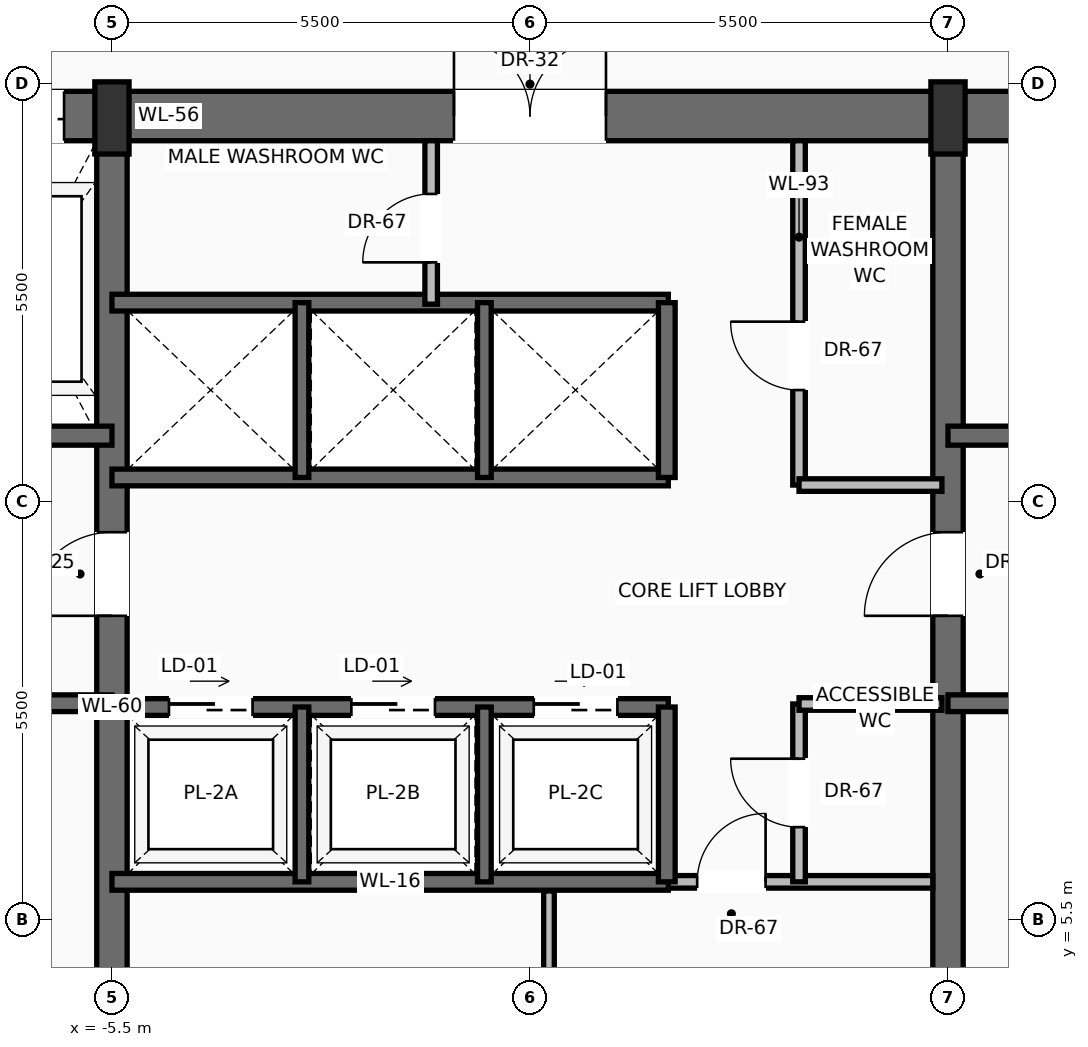
"""IFC4 building model, lengths in metres.
Left out: names, types, materials, properties, quantities, classifications, styles, units other than length and angle.
Written with IfcOpenShell. Run it as: python <this file> out.ifc"""

import sys

from ifc_helpers import new_model, si_unit, direction, frame, frame_2d, origin, origin_2d, place, context, subcontext, project, spatial, rectangle, extrude, source, transform, mapped, element, fill, save


model = new_model("IFC4")
c1 = context("Model", 3, precision=1e-05, world=origin(), true_north=direction((0.0, 1.0)))
c2 = subcontext(c1, "Body", "Model", "MODEL_VIEW")
j1 = project(units=[si_unit("LENGTHUNIT", "METRE"), si_unit("PLANEANGLEUNIT", "RADIAN")], contexts=[c1])
p1 = place(None, origin())
s1 = spatial("IfcSite", under=j1, at=p1, CompositionType="ELEMENT")
p2 = place(p1, origin())
s2 = spatial("IfcBuilding", under=s1, at=p2, CompositionType="ELEMENT")
p3 = place(p2, frame((0.0, 0.0, 171.0)))
s3 = spatial("IfcBuildingStorey", under=s2, at=p3, CompositionType="ELEMENT", Elevation=171.0)
p4 = place(p3, frame((-10.8, 16.075, 0.0), z_axis=(0.0, 0.0, 1.0), x_axis=(1.0, 0.0, 0.0)))
e1 = element("IfcWall", 1, at=p4, inside=s3, PredefinedType="SHEAR", context=c2, shape_type="SweptSolid", body=[
    extrude(rectangle(XDim=21.6, YDim=0.65, at=frame_2d((10.8, 0.0))), origin(), (0.0, 0.0, 1.0), 3.47),
])
p5 = place(p4, frame((3.37, 0.0, 0.0)))
e2 = element("IfcOpeningElement", 2, at=p5, cuts=e1, PredefinedType="OPENING", context=c2, shape_type="SweptSolid", body=[
    extrude(rectangle(XDim=1.3, YDim=2.3, at=frame_2d((0.65, 1.15))), frame((0.0, 0.335, 0.0), z_axis=(0.0, -1.0, 0.0), x_axis=(1.0, 0.0, 0.0)), (0.0, 0.0, 1.0), 0.67),
])
p6 = place(p4, frame((9.8, 0.0, 0.0)))
e3 = element("IfcOpeningElement", 3, at=p6, cuts=e1, PredefinedType="OPENING", context=c2, shape_type="SweptSolid", body=[
    extrude(rectangle(XDim=2.0, YDim=2.4, at=frame_2d((1.0, 1.2))), frame((0.0, 0.335, 0.0), z_axis=(0.0, -1.0, 0.0), x_axis=(1.0, 0.0, 0.0)), (0.0, 0.0, 1.0), 0.67),
])
p7 = place(p3, frame((-5.5, 0.525, 0.0), z_axis=(0.0, 0.0, 1.0), x_axis=(0.0, 1.0, 0.0)))
e4 = element("IfcWall", 4, at=p7, inside=s3, PredefinedType="SHEAR", context=c2, shape_type="SweptSolid", body=[
    extrude(rectangle(XDim=15.55, YDim=0.4, at=frame_2d((7.775, 0.0))), origin(), (0.0, 0.0, 1.0), 3.47),
])
p8 = place(p7, frame((8.975, 0.0, 0.0)))
e5 = element("IfcOpeningElement", 5, at=p8, cuts=e4, PredefinedType="OPENING", context=c2, shape_type="SweptSolid", body=[
    extrude(rectangle(XDim=1.1, YDim=2.2, at=frame_2d((0.55, 1.1))), frame((0.0, 0.21, 0.0), z_axis=(0.0, -1.0, 0.0), x_axis=(1.0, 0.0, 0.0)), (0.0, 0.0, 1.0), 0.42),
])
p9 = place(p3, frame((5.5, 0.525, 0.0), z_axis=(0.0, 0.0, 1.0), x_axis=(0.0, 1.0, 0.0)))
e6 = element("IfcWall", 6, at=p9, inside=s3, PredefinedType="SHEAR", context=c2, shape_type="SweptSolid", body=[
    extrude(rectangle(XDim=15.55, YDim=0.4, at=frame_2d((7.775, 0.0))), origin(), (0.0, 0.0, 1.0), 3.47),
])
p10 = place(p9, frame((8.975, 0.0, 0.0)))
e7 = element("IfcOpeningElement", 7, at=p10, cuts=e6, PredefinedType="OPENING", context=c2, shape_type="SweptSolid", body=[
    extrude(rectangle(XDim=1.1, YDim=2.2, at=frame_2d((0.55, 1.1))), frame((0.0, 0.21, 0.0), z_axis=(0.0, -1.0, 0.0), x_axis=(1.0, 0.0, 0.0)), (0.0, 0.0, 1.0), 0.42),
])
m1 = source(origin(), c2, "Body", "SweptSolid", [
    extrude(rectangle(XDim=0.45, YDim=0.95, at=origin_2d()), origin(), (0.0, 0.0, 1.0), 3.7),
])
for number, where, z_axis, x_axis in (
    (8, (-5.5, 16.05, 0.0), (0.0, 0.0, 1.0), (1.0, 0.0, 0.0)),
    (9, (5.5, 16.05, 0.0), (0.0, 0.0, 1.0), (1.0, 0.0, 0.0)),
):
    element("IfcColumn", number, at=place(p3, frame(where, z_axis=z_axis, x_axis=x_axis)), inside=s3, PredefinedType="PILASTER", context=c2, shape_type="MappedRepresentation", body=[
        mapped(m1, transform((0.0, 0.0, 0.0), scale=1.0)),
    ])
p11 = place(p3, frame((-5.5, 8.35, 0.0), z_axis=(0.0, 0.0, 1.0), x_axis=(-1.0, 0.0, 0.0)))
e10 = element("IfcWall", 10, at=p11, inside=s3, PredefinedType="SOLIDWALL", context=c2, shape_type="SweptSolid", body=[
    extrude(rectangle(XDim=4.65, YDim=0.22, at=frame_2d((2.325, 0.0))), origin(), (0.0, 0.0, 1.0), 3.47),
])
p12 = place(p11, frame((2.5, 0.0, 0.0)))
e11 = element("IfcOpeningElement", 11, at=p12, cuts=e10, PredefinedType="OPENING", context=c2, shape_type="SweptSolid", body=[
    extrude(rectangle(XDim=1.15, YDim=2.2, at=frame_2d((0.575, 1.1))), frame((0.0, 0.12, 0.0), z_axis=(0.0, -1.0, 0.0), x_axis=(1.0, 0.0, 0.0)), (0.0, 0.0, 1.0), 0.24),
])
p13 = place(p3, frame((-5.5, 11.87, 0.0), z_axis=(0.0, 0.0, 1.0), x_axis=(-1.0, 0.0, 0.0)))
e12 = element("IfcWall", 12, at=p13, inside=s3, PredefinedType="SOLIDWALL", context=c2, shape_type="SweptSolid", body=[
    extrude(rectangle(XDim=4.65, YDim=0.25, at=frame_2d((2.325, 0.0))), origin(), (0.0, 0.0, 1.0), 3.47),
])
p14 = place(p13, frame((2.95, 0.0, 0.0)))
e13 = element("IfcOpeningElement", 13, at=p14, cuts=e12, PredefinedType="OPENING", context=c2, shape_type="SweptSolid", body=[
    extrude(rectangle(XDim=1.2, YDim=2.25, at=frame_2d((0.6, 1.125))), frame((0.0, 0.135, 0.0), z_axis=(0.0, -1.0, 0.0), x_axis=(1.0, 0.0, 0.0)), (0.0, 0.0, 1.0), 0.27),
])
p15 = place(p3, frame((10.15, 8.35, 0.0), z_axis=(0.0, 0.0, 1.0), x_axis=(-1.0, 0.0, 0.0)))
e14 = element("IfcWall", 14, at=p15, inside=s3, PredefinedType="SOLIDWALL", context=c2, shape_type="SweptSolid", body=[
    extrude(rectangle(XDim=4.65, YDim=0.22, at=frame_2d((2.325, 0.0))), origin(), (0.0, 0.0, 1.0), 3.47),
])
p16 = place(p15, frame((1.0, 0.0, 0.0)))
e15 = element("IfcOpeningElement", 15, at=p16, cuts=e14, PredefinedType="OPENING", context=c2, shape_type="SweptSolid", body=[
    extrude(rectangle(XDim=1.15, YDim=2.2, at=frame_2d((0.575, 1.1))), frame((0.0, 0.12, 0.0), z_axis=(0.0, -1.0, 0.0), x_axis=(1.0, 0.0, 0.0)), (0.0, 0.0, 1.0), 0.24),
])
p17 = place(p3, frame((10.15, 11.87, 0.0), z_axis=(0.0, 0.0, 1.0), x_axis=(-1.0, 0.0, 0.0)))
e16 = element("IfcWall", 16, at=p17, inside=s3, PredefinedType="SOLIDWALL", context=c2, shape_type="SweptSolid", body=[
    extrude(rectangle(XDim=4.65, YDim=0.25, at=frame_2d((2.325, 0.0))), origin(), (0.0, 0.0, 1.0), 3.47),
])
p18 = place(p17, frame((0.5, 0.0, 0.0)))
e17 = element("IfcOpeningElement", 17, at=p18, cuts=e16, PredefinedType="OPENING", context=c2, shape_type="SweptSolid", body=[
    extrude(rectangle(XDim=1.2, YDim=2.25, at=frame_2d((0.6, 1.125))), frame((0.0, 0.135, 0.0), z_axis=(0.0, -1.0, 0.0), x_axis=(1.0, 0.0, 0.0)), (0.0, 0.0, 1.0), 0.27),
])
p19 = place(p3, frame((1.82, 6.0, 0.0), z_axis=(0.0, 0.0, 1.0), x_axis=(1.0, 0.0, 0.0)))
e18 = element("IfcWall", 18, at=p19, inside=s3, PredefinedType="PARTITIONING", context=c2, shape_type="SweptSolid", body=[
    extrude(rectangle(XDim=3.48, YDim=0.165, at=frame_2d((1.74, 0.0))), origin(), (0.0, 0.0, 1.0), 3.462),
])
p20 = place(p19, frame((0.38, 0.0, 0.0)))
e19 = element("IfcOpeningElement", 19, at=p20, cuts=e18, PredefinedType="OPENING", context=c2, shape_type="SweptSolid", body=[
    extrude(rectangle(XDim=0.9, YDim=2.1, at=frame_2d((0.45, 1.05))), frame((0.0, 0.093, 0.0), z_axis=(0.0, -1.0, 0.0), x_axis=(1.0, 0.0, 0.0)), (0.0, 0.0, 1.0), 0.185),
])
p21 = place(p3, frame((0.25, 0.85, 0.0), z_axis=(0.0, 0.0, 1.0), x_axis=(0.0, 1.0, 0.0)))
e20 = element("IfcWall", 20, at=p21, inside=s3, PredefinedType="PARTITIONING", context=c2, shape_type="SweptSolid", body=[
    extrude(rectangle(XDim=5.03, YDim=0.14, at=frame_2d((2.515, 0.0))), origin(), (0.0, 0.0, 1.0), 3.462),
])
p22 = place(p21, frame((2.1, 0.0, 0.0)))
e21 = element("IfcOpeningElement", 21, at=p22, cuts=e20, PredefinedType="OPENING", context=c2, shape_type="SweptSolid", body=[
    extrude(rectangle(XDim=0.9, YDim=2.1, at=frame_2d((0.45, 1.05))), frame((0.0, 0.08, 0.0), z_axis=(0.0, -1.0, 0.0), x_axis=(1.0, 0.0, 0.0)), (0.0, 0.0, 1.0), 0.16),
])
p23 = place(p3, frame((3.54, 6.0, 0.0), z_axis=(0.0, 0.0, 1.0), x_axis=(0.0, 1.0, 0.0)))
e22 = element("IfcWall", 22, at=p23, inside=s3, PredefinedType="PARTITIONING", context=c2, shape_type="SweptSolid", body=[
    extrude(rectangle(XDim=2.34, YDim=0.165, at=frame_2d((1.17, 0.0))), origin(), (0.0, 0.0, 1.0), 3.462),
])
p24 = place(p23, frame((0.72, 0.0, 0.0)))
e23 = element("IfcOpeningElement", 23, at=p24, cuts=e22, PredefinedType="OPENING", context=c2, shape_type="SweptSolid", body=[
    extrude(rectangle(XDim=0.9, YDim=2.1, at=frame_2d((0.45, 1.05))), frame((0.0, 0.093, 0.0), z_axis=(0.0, -1.0, 0.0), x_axis=(1.0, 0.0, 0.0)), (0.0, 0.0, 1.0), 0.185),
])
p25 = place(p3, frame((3.54, 8.34, 0.0), z_axis=(0.0, 0.0, 1.0), x_axis=(1.0, 0.0, 0.0)))
e24 = element("IfcWall", 24, at=p25, inside=s3, PredefinedType="PARTITIONING", context=c2, shape_type="SweptSolid", body=[
    extrude(rectangle(XDim=1.88, YDim=0.165, at=frame_2d((0.94, 0.0))), origin(), (0.0, 0.0, 1.0), 3.462),
])
p26 = place(p3, frame((-5.5, 6.0, 0.0), z_axis=(0.0, 0.0, 1.0), x_axis=(1.0, 0.0, 0.0)))
e25 = element("IfcWall", 25, at=p26, inside=s3, PredefinedType="SOLIDWALL", context=c2, shape_type="SweptSolid", body=[
    extrude(rectangle(XDim=7.32, YDim=0.22, at=frame_2d((3.66, 0.0))), origin(), (0.0, 0.0, 1.0), 3.47),
])
p27 = place(p3, frame((-5.5, 8.3, 0.0), z_axis=(0.0, 0.0, 1.0), x_axis=(1.0, 0.0, 0.0)))
e26 = element("IfcWall", 26, at=p27, inside=s3, PredefinedType="SOLIDWALL", context=c2, shape_type="SweptSolid", body=[
    extrude(rectangle(XDim=7.32, YDim=0.22, at=frame_2d((3.66, 0.0))), origin(), (0.0, 0.0, 1.0), 3.47),
])
p28 = place(p27, frame((0.75, 0.0, 0.0)))
e27 = element("IfcOpeningElement", 27, at=p28, cuts=e26, PredefinedType="OPENING", context=c2, shape_type="SweptSolid", body=[
    extrude(rectangle(XDim=1.1, YDim=2.2, at=frame_2d((0.55, 1.1))), frame((0.0, 0.12, 0.0), z_axis=(0.0, -1.0, 0.0), x_axis=(1.0, 0.0, 0.0)), (0.0, 0.0, 1.0), 0.24),
])
p29 = place(p27, frame((3.15, 0.0, 0.0)))
e28 = element("IfcOpeningElement", 28, at=p29, cuts=e26, PredefinedType="OPENING", context=c2, shape_type="SweptSolid", body=[
    extrude(rectangle(XDim=1.1, YDim=2.2, at=frame_2d((0.55, 1.1))), frame((0.0, 0.12, 0.0), z_axis=(0.0, -1.0, 0.0), x_axis=(1.0, 0.0, 0.0)), (0.0, 0.0, 1.0), 0.24),
])
p30 = place(p27, frame((5.55, 0.0, 0.0)))
e29 = element("IfcOpeningElement", 29, at=p30, cuts=e26, PredefinedType="OPENING", context=c2, shape_type="SweptSolid", body=[
    extrude(rectangle(XDim=1.1, YDim=2.2, at=frame_2d((0.55, 1.1))), frame((0.0, 0.12, 0.0), z_axis=(0.0, -1.0, 0.0), x_axis=(1.0, 0.0, 0.0)), (0.0, 0.0, 1.0), 0.24),
])
p31 = place(p3, frame((1.8, 6.0, 0.0), z_axis=(0.0, 0.0, 1.0), x_axis=(0.0, 1.0, 0.0)))
e30 = element("IfcWall", 30, at=p31, inside=s3, PredefinedType="SOLIDWALL", context=c2, shape_type="SweptSolid", body=[
    extrude(rectangle(XDim=2.3, YDim=0.22, at=frame_2d((1.15, 0.0))), origin(), (0.0, 0.0, 1.0), 3.47),
])
for number, where, z_axis, x_axis in (
    (31, (-3.0, 6.0, 0.0), (0.0, 0.0, 1.0), (0.0, 1.0, 0.0)),
    (32, (-0.6, 6.0, 0.0), (0.0, 0.0, 1.0), (0.0, 1.0, 0.0)),
):
    element("IfcWall", number, at=place(p3, frame(where, z_axis=z_axis, x_axis=x_axis)), inside=s3, PredefinedType="SOLIDWALL", context=c2, shape_type="SweptSolid", body=[
        extrude(rectangle(XDim=2.3, YDim=0.18, at=frame_2d((1.15, 0.0))), origin(), (0.0, 0.0, 1.0), 3.47),
    ])
for number, where, z_axis, x_axis in (
    (33, (-5.5, 11.32, 0.0), (0.0, 0.0, 1.0), (1.0, 0.0, 0.0)),
    (34, (-5.5, 13.62, 0.0), (0.0, 0.0, 1.0), (1.0, 0.0, 0.0)),
):
    element("IfcWall", number, at=place(p3, frame(where, z_axis=z_axis, x_axis=x_axis)), inside=s3, PredefinedType="SOLIDWALL", context=c2, shape_type="SweptSolid", body=[
        extrude(rectangle(XDim=7.32, YDim=0.22, at=frame_2d((3.66, 0.0))), origin(), (0.0, 0.0, 1.0), 3.47),
    ])
p32 = place(p3, frame((1.8, 11.32, 0.0), z_axis=(0.0, 0.0, 1.0), x_axis=(0.0, 1.0, 0.0)))
e35 = element("IfcWall", 35, at=p32, inside=s3, PredefinedType="SOLIDWALL", context=c2, shape_type="SweptSolid", body=[
    extrude(rectangle(XDim=2.3, YDim=0.22, at=frame_2d((1.15, 0.0))), origin(), (0.0, 0.0, 1.0), 3.47),
])
for number, where, z_axis, x_axis in (
    (36, (-3.0, 11.32, 0.0), (0.0, 0.0, 1.0), (0.0, 1.0, 0.0)),
    (37, (-0.6, 11.32, 0.0), (0.0, 0.0, 1.0), (0.0, 1.0, 0.0)),
):
    element("IfcWall", number, at=place(p3, frame(where, z_axis=z_axis, x_axis=x_axis)), inside=s3, PredefinedType="SOLIDWALL", context=c2, shape_type="SweptSolid", body=[
        extrude(rectangle(XDim=2.3, YDim=0.18, at=frame_2d((1.15, 0.0))), origin(), (0.0, 0.0, 1.0), 3.47),
    ])
p33 = place(p3, frame((-1.3, 13.6, 0.0), z_axis=(0.0, 0.0, 1.0), x_axis=(0.0, 1.0, 0.0)))
e38 = element("IfcWall", 38, at=p33, inside=s3, PredefinedType="PARTITIONING", context=c2, shape_type="SweptSolid", body=[
    extrude(rectangle(XDim=2.15, YDim=0.165, at=frame_2d((1.075, 0.0))), origin(), (0.0, 0.0, 1.0), 3.462),
])
p34 = place(p33, frame((0.55, 0.0, 0.0)))
e39 = element("IfcOpeningElement", 39, at=p34, cuts=e38, PredefinedType="OPENING", context=c2, shape_type="SweptSolid", body=[
    extrude(rectangle(XDim=0.9, YDim=2.1, at=frame_2d((0.45, 1.05))), frame((0.0, 0.093, 0.0), z_axis=(0.0, -1.0, 0.0), x_axis=(1.0, 0.0, 0.0)), (0.0, 0.0, 1.0), 0.185),
])
p35 = place(p3, frame((3.54, 11.22, 0.0), z_axis=(0.0, 0.0, 1.0), x_axis=(0.0, 1.0, 0.0)))
e40 = element("IfcWall", 40, at=p35, inside=s3, PredefinedType="PARTITIONING", context=c2, shape_type="SweptSolid", body=[
    extrude(rectangle(XDim=4.53, YDim=0.165, at=frame_2d((2.265, 0.0))), origin(), (0.0, 0.0, 1.0), 3.462),
])
p36 = place(p35, frame((1.25, 0.0, 0.0)))
e41 = element("IfcOpeningElement", 41, at=p36, cuts=e40, PredefinedType="OPENING", context=c2, shape_type="SweptSolid", body=[
    extrude(rectangle(XDim=0.9, YDim=2.1, at=frame_2d((0.45, 1.05))), frame((0.0, 0.093, 0.0), z_axis=(0.0, -1.0, 0.0), x_axis=(1.0, 0.0, 0.0)), (0.0, 0.0, 1.0), 0.185),
])
p37 = place(p3, frame((3.54, 11.22, 0.0), z_axis=(0.0, 0.0, 1.0), x_axis=(1.0, 0.0, 0.0)))
e42 = element("IfcWall", 42, at=p37, inside=s3, PredefinedType="PARTITIONING", context=c2, shape_type="SweptSolid", body=[
    extrude(rectangle(XDim=1.88, YDim=0.165, at=frame_2d((0.94, 0.0))), origin(), (0.0, 0.0, 1.0), 3.462),
])
m2 = source(origin(), c2, "Body", "SweptSolid", [
    extrude(rectangle(XDim=1.1, YDim=2.2, at=frame_2d((0.55, 1.1))), frame((0.0, 0.025, 0.0), z_axis=(0.0, -1.0, 0.0), x_axis=(1.0, 0.0, 0.0)), (0.0, 0.0, 1.0), 0.05),
])
p38 = place(p8, origin())
e43 = element("IfcDoor", 43, at=p38, inside=s3, OperationType="SINGLE_SWING_LEFT", PredefinedType="DOOR", context=c2, shape_type="MappedRepresentation", body=[
    mapped(m2, transform((0.0, 0.0, 0.0), scale=1.0)),
])
fill(e5, e43)
m3 = source(origin(), c2, "Body", "SweptSolid", [
    extrude(rectangle(XDim=1.3, YDim=2.3, at=frame_2d((0.65, 1.15))), frame((0.0, 0.025, 0.0), z_axis=(0.0, -1.0, 0.0), x_axis=(1.0, 0.0, 0.0)), (0.0, 0.0, 1.0), 0.05),
])
p39 = place(p5, origin())
e44 = element("IfcDoor", 44, at=p39, inside=s3, OperationType="SLIDING_TO_RIGHT", PredefinedType="DOOR", context=c2, shape_type="MappedRepresentation", body=[
    mapped(m3, transform((0.0, 0.0, 0.0), scale=1.0)),
])
fill(e2, e44)
p40 = place(p10, origin())
e45 = element("IfcDoor", 45, at=p40, inside=s3, OperationType="SINGLE_SWING_LEFT", PredefinedType="DOOR", context=c2, shape_type="MappedRepresentation", body=[
    mapped(m2, transform((0.0, 0.0, 0.0), scale=1.0)),
])
fill(e7, e45)
m4 = source(origin(), c2, "Body", "SweptSolid", [
    extrude(rectangle(XDim=2.0, YDim=2.4, at=frame_2d((1.0, 1.2))), frame((0.0, 0.025, 0.0), z_axis=(0.0, -1.0, 0.0), x_axis=(1.0, 0.0, 0.0)), (0.0, 0.0, 1.0), 0.05),
])
p41 = place(p6, origin())
e46 = element("IfcDoor", 46, at=p41, inside=s3, OperationType="DOUBLE_DOOR_SINGLE_SWING", PredefinedType="DOOR", context=c2, shape_type="MappedRepresentation", body=[
    mapped(m4, transform((0.0, 0.0, 0.0), scale=1.0)),
])
fill(e3, e46)
m5 = source(origin(), c2, "Body", "SweptSolid", [
    extrude(rectangle(XDim=0.9, YDim=2.1, at=frame_2d((0.45, 1.05))), frame((0.0, 0.025, 0.0), z_axis=(0.0, -1.0, 0.0), x_axis=(1.0, 0.0, 0.0)), (0.0, 0.0, 1.0), 0.05),
])
p42 = place(p20, origin())
e47 = element("IfcDoor", 47, at=p42, inside=s3, OperationType="SINGLE_SWING_RIGHT", PredefinedType="DOOR", context=c2, shape_type="MappedRepresentation", body=[
    mapped(m5, transform((0.0, 0.0, 0.0), scale=1.0)),
])
fill(e19, e47)
p43 = place(p24, origin())
e48 = element("IfcDoor", 48, at=p43, inside=s3, OperationType="SINGLE_SWING_RIGHT", PredefinedType="DOOR", context=c2, shape_type="MappedRepresentation", body=[
    mapped(m5, transform((0.0, 0.0, 0.0), scale=1.0)),
])
fill(e23, e48)
m6 = source(origin(), c2, "Body", "SweptSolid", [
    extrude(rectangle(XDim=1.1, YDim=2.2, at=frame_2d((0.55, 1.1))), frame((0.0, 0.025, 0.0), z_axis=(0.0, -1.0, 0.0), x_axis=(1.0, 0.0, 0.0)), (0.0, 0.0, 1.0), 0.05),
])
p44 = place(p28, origin())
e49 = element("IfcDoor", 49, at=p44, inside=s3, OperationType="SLIDING_TO_LEFT", PredefinedType="DOOR", context=c2, shape_type="MappedRepresentation", body=[
    mapped(m6, transform((0.0, 0.0, 0.0), scale=1.0)),
])
fill(e27, e49)
p45 = place(p29, origin())
e50 = element("IfcDoor", 50, at=p45, inside=s3, OperationType="SLIDING_TO_LEFT", PredefinedType="DOOR", context=c2, shape_type="MappedRepresentation", body=[
    mapped(m6, transform((0.0, 0.0, 0.0), scale=1.0)),
])
fill(e28, e50)
p46 = place(p30, origin())
e51 = element("IfcDoor", 51, at=p46, inside=s3, OperationType="SLIDING_TO_LEFT", PredefinedType="DOOR", context=c2, shape_type="MappedRepresentation", body=[
    mapped(m6, transform((0.0, 0.0, 0.0), scale=1.0)),
])
fill(e29, e51)
p47 = place(p34, origin())
e52 = element("IfcDoor", 52, at=p47, inside=s3, OperationType="SINGLE_SWING_LEFT", PredefinedType="DOOR", context=c2, shape_type="MappedRepresentation", body=[
    mapped(m5, transform((0.0, 0.0, 0.0), scale=1.0)),
])
fill(e39, e52)
p48 = place(p36, origin())
e53 = element("IfcDoor", 53, at=p48, inside=s3, OperationType="SINGLE_SWING_RIGHT", PredefinedType="DOOR", context=c2, shape_type="MappedRepresentation", body=[
    mapped(m5, transform((0.0, 0.0, 0.0), scale=1.0)),
])
fill(e41, e53)
save(model, sys.argv[1])
